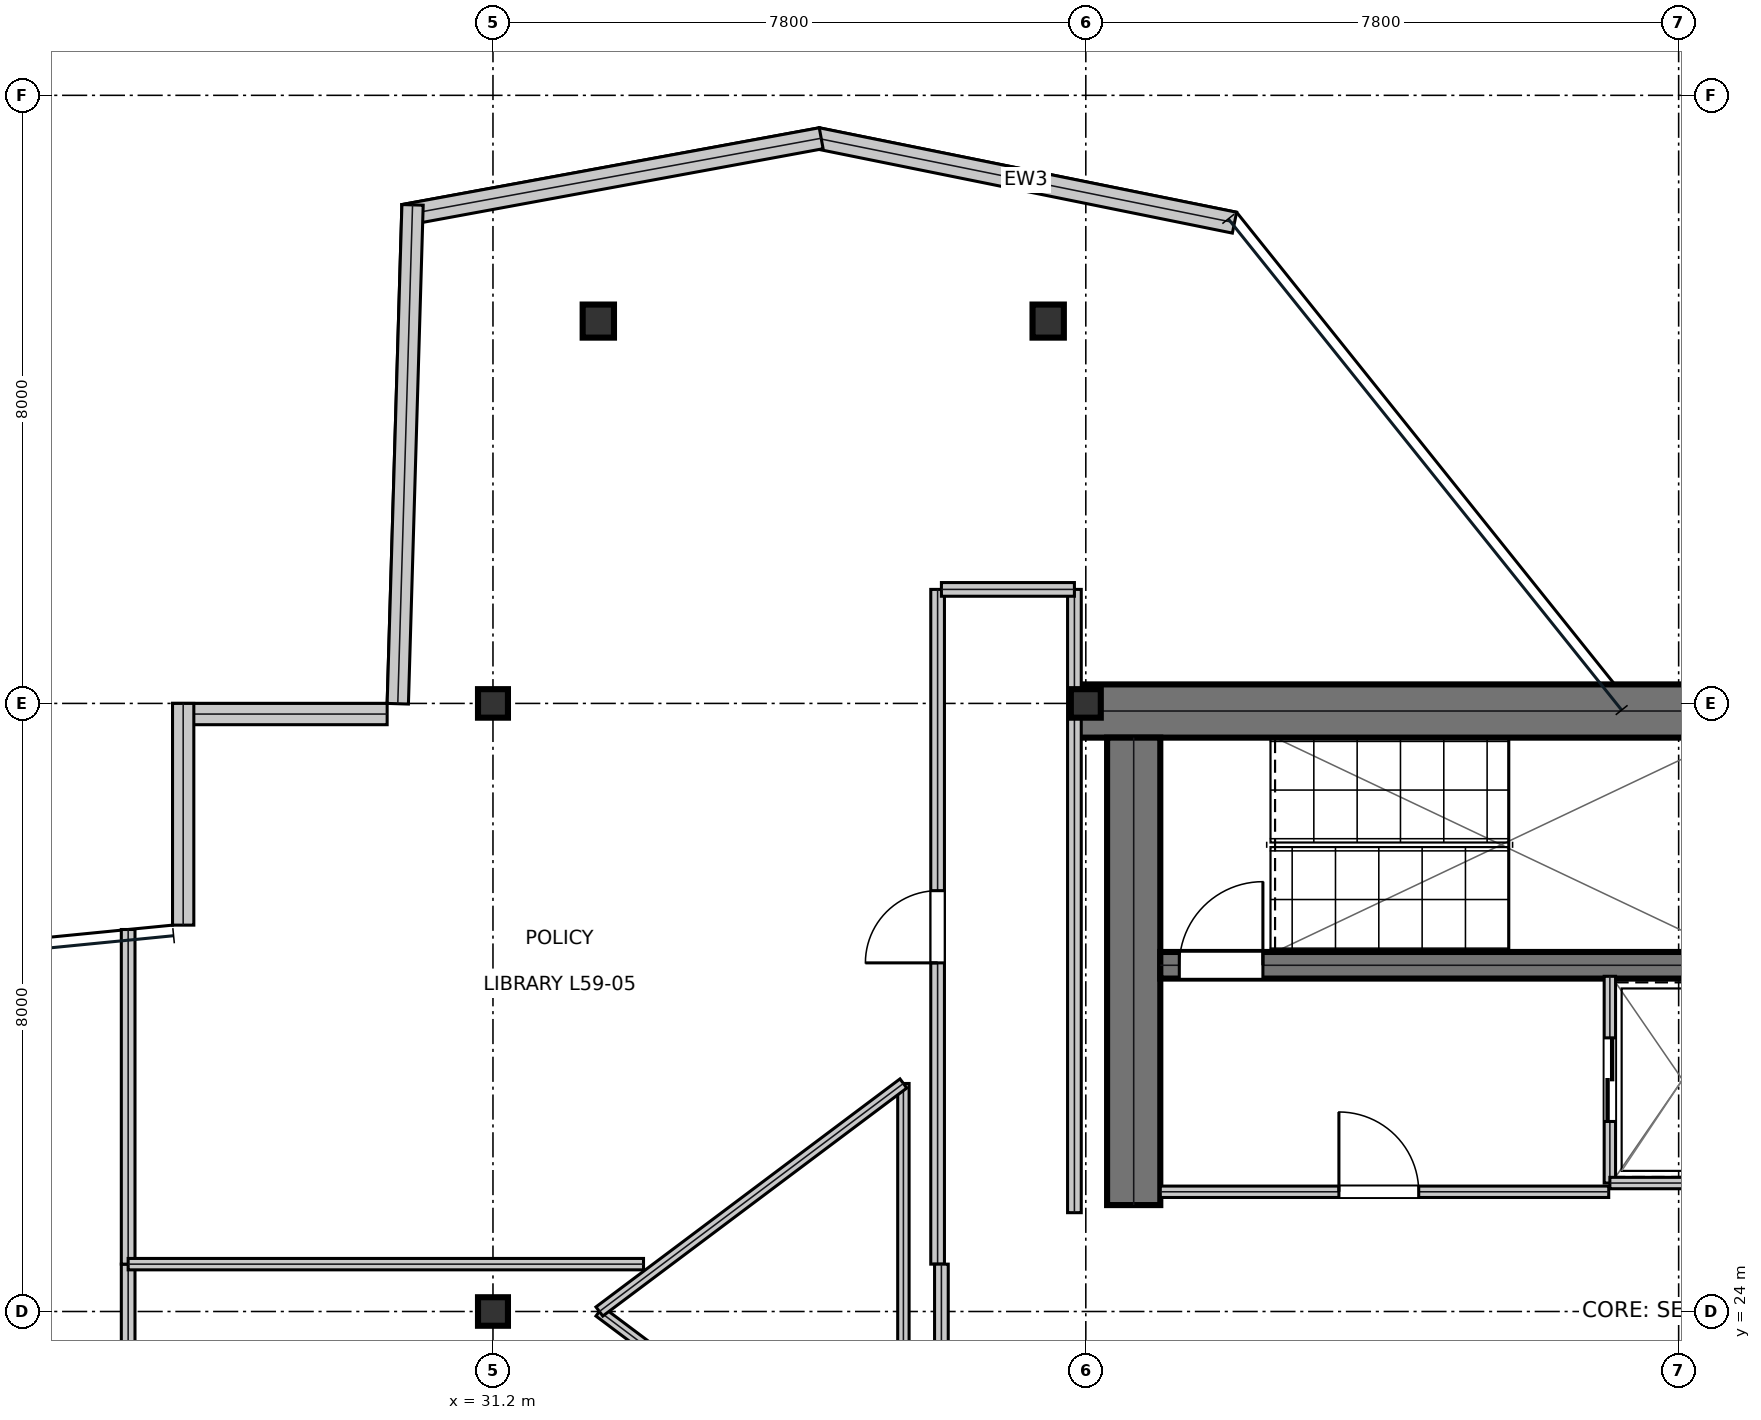
"""IFC4 building model, lengths in metres.
Left out: names, types, materials, properties, quantities, classifications, styles, units other than length and angle.
Written with IfcOpenShell. Run it as: python <this file> out.ifc"""

import sys

from ifc_helpers import new_model, si_unit, direction, frame, frame_2d, origin, origin_2d, place, context, subcontext, project, spatial, rectangle, i_section, extrude, element, fill, save


model = new_model("IFC4")
c1 = context("Model", 3, precision=1e-05, world=origin(), true_north=direction((0.0, 1.0)))
c2 = subcontext(c1, "Body", "Model", "MODEL_VIEW")
j1 = project(units=[si_unit("LENGTHUNIT", "METRE"), si_unit("PLANEANGLEUNIT", "RADIAN")], contexts=[c1])
p1 = place(None, origin())
s1 = spatial("IfcSite", under=j1, at=p1, CompositionType="ELEMENT")
p2 = place(p1, origin())
s2 = spatial("IfcBuilding", under=s1, at=p2, CompositionType="ELEMENT")
p3 = place(p2, frame((0.0, 0.0, 252.6)))
s3 = spatial("IfcBuildingStorey", under=s2, at=p3, CompositionType="ELEMENT", Elevation=252.6)
p4 = place(p3, frame((38.8, 31.9, 0.0), z_axis=(0.0, 0.0, 1.0), x_axis=(1.0, 0.0, 0.0)))
e1 = element("IfcWall", 1, at=p4, inside=s3, PredefinedType="SHEAR", context=c2, shape_type="SweptSolid", body=[
    extrude(rectangle(XDim=16.0, YDim=0.7, at=frame_2d((8.0, 0.0))), origin(), (0.0, 0.0, 1.0), 3.73),
])
p5 = place(p3, frame((39.63, 25.4, 0.0), z_axis=(0.0, 0.0, 1.0), x_axis=(0.0, 1.0, 0.0)))
e2 = element("IfcWall", 2, at=p5, inside=s3, PredefinedType="SHEAR", context=c2, shape_type="SweptSolid", body=[
    extrude(rectangle(XDim=6.15, YDim=0.7, at=frame_2d((3.075, 0.0))), origin(), (0.0, 0.0, 1.0), 3.73),
])
p6 = place(p3, frame((39.98, 28.555, 0.0), z_axis=(0.0, 0.0, 1.0), x_axis=(1.0, 0.0, 0.0)))
e3 = element("IfcWall", 3, at=p6, inside=s3, PredefinedType="SHEAR", context=c2, shape_type="SweptSolid", body=[
    extrude(rectangle(XDim=7.71, YDim=0.35, at=frame_2d((3.855, 0.0))), origin(), (0.0, 0.0, 1.0), 3.73),
])
p7 = place(p6, frame((0.25, 0.0, 0.0)))
e4 = element("IfcOpeningElement", 4, at=p7, cuts=e3, PredefinedType="OPENING", context=c2, shape_type="SweptSolid", body=[
    extrude(rectangle(XDim=1.1, YDim=2.15, at=frame_2d((0.55, 1.075))), frame((0.0, 0.185, 0.0), z_axis=(0.0, -1.0, 0.0), x_axis=(1.0, 0.0, 0.0)), (0.0, 0.0, 1.0), 0.37),
])
for number, where, z_axis, x_axis in (
    (5, (31.2, 24.0, 0.0), (0.0, 0.0, 1.0), (1.0, 0.0, 0.0)),
    (6, (31.2, 32.0, 0.0), (0.0, 0.0, 1.0), (1.0, 0.0, 0.0)),
    (7, (39.0, 32.0, 0.0), (0.0, 0.0, 1.0), (1.0, 0.0, 0.0)),
):
    element("IfcColumn", number, at=place(p3, frame(where, z_axis=z_axis, x_axis=x_axis)), inside=s3, PredefinedType="COLUMN", context=c2, shape_type="SweptSolid", body=[
        extrude(i_section(OverallWidth=0.394, OverallDepth=0.375, WebThickness=0.017, FlangeThickness=0.028, at=origin_2d()), origin(), (0.0, 0.0, 1.0), 4.044),
    ])
p8 = place(p3, frame((32.586, 37.03, 0.016), z_axis=(0.009051266318, -0.01943896122, 0.999770074249), x_axis=(0.90654468166, 0.422109867398, 0.0)))
e8 = element("IfcColumn", 8, at=p8, inside=s3, PredefinedType="COLUMN", context=c2, shape_type="SweptSolid", body=[
    extrude(i_section(OverallWidth=0.412, OverallDepth=0.435, WebThickness=0.036, FlangeThickness=0.058, at=origin_2d()), origin(), (0.0, 0.0, 1.0), 4.019),
])
p9 = place(p3, frame((38.505, 37.03, 0.016), z_axis=(-0.003219693154, -0.019439656781, 0.999805847813), x_axis=(0.986560065704, -0.163399010882, 0.0)))
e9 = element("IfcColumn", 9, at=p9, inside=s3, PredefinedType="COLUMN", context=c2, shape_type="SweptSolid", body=[
    extrude(i_section(OverallWidth=0.412, OverallDepth=0.435, WebThickness=0.036, FlangeThickness=0.058, at=origin_2d()), origin(), (0.0, 0.0, 1.0), 4.019),
])
p10 = place(p3, frame((40.956, 38.325, 0.0), z_axis=(0.0, 0.0, 1.0), x_axis=(-0.980137399087, 0.198319638238, 0.0)))
e10 = element("IfcWall", 10, at=p10, inside=s3, PredefinedType="STANDARD", context=c2, shape_type="SweptSolid", body=[
    extrude(rectangle(XDim=5.603, YDim=0.28, at=frame_2d((2.801, 0.0))), origin(), (0.0, 0.0, 1.0), 3.73),
])
p11 = place(p3, frame((35.518, 39.435, 0.0), z_axis=(0.0, 0.0, 1.0), x_axis=(-0.983500515457, -0.180905323571, 0.0)))
e11 = element("IfcWall", 11, at=p11, inside=s3, PredefinedType="STANDARD", context=c2, shape_type="SweptSolid", body=[
    extrude(rectangle(XDim=5.583, YDim=0.28, at=frame_2d((2.792, 0.0))), origin(), (0.0, 0.0, 1.0), 3.73),
])
p12 = place(p3, frame((30.142, 38.559, 0.0), z_axis=(0.0, 0.0, 1.0), x_axis=(-0.029597919089, -0.999561885621, 0.0)))
e12 = element("IfcWall", 12, at=p12, inside=s3, PredefinedType="STANDARD", context=c2, shape_type="SweptSolid", body=[
    extrude(rectangle(XDim=6.566, YDim=0.28, at=frame_2d((3.283, 0.0))), origin(), (0.0, 0.0, 1.0), 3.73),
])
p13 = place(p3, frame((29.808, 31.86, 0.0), z_axis=(0.0, 0.0, 1.0), x_axis=(-1.0, 0.0, 0.0)))
e13 = element("IfcWall", 13, at=p13, inside=s3, PredefinedType="STANDARD", context=c2, shape_type="SweptSolid", body=[
    extrude(rectangle(XDim=2.824, YDim=0.28, at=frame_2d((1.412, 0.0))), origin(), (0.0, 0.0, 1.0), 3.73),
])
p14 = place(p3, frame((27.124, 32.0, 0.0), z_axis=(0.0, 0.0, 1.0), x_axis=(0.0, -1.0, 0.0)))
e14 = element("IfcWall", 14, at=p14, inside=s3, PredefinedType="STANDARD", context=c2, shape_type="SweptSolid", body=[
    extrude(rectangle(XDim=2.917, YDim=0.28, at=frame_2d((1.458, 0.0))), origin(), (0.0, 0.0, 1.0), 3.259),
])
p15 = place(p3, frame((39.98, 25.575, 0.0), z_axis=(0.0, 0.0, 1.0), x_axis=(1.0, 0.0, 0.0)))
e15 = element("IfcWall", 15, at=p15, inside=s3, PredefinedType="PARTITIONING", context=c2, shape_type="SweptSolid", body=[
    extrude(rectangle(XDim=5.9, YDim=0.15, at=frame_2d((2.95, 0.0))), origin(), (0.0, 0.0, 1.0), 3.73),
])
p16 = place(p15, frame((2.35, 0.0, 0.0)))
e16 = element("IfcOpeningElement", 16, at=p16, cuts=e15, PredefinedType="OPENING", context=c2, shape_type="SweptSolid", body=[
    extrude(rectangle(XDim=1.05, YDim=2.15, at=frame_2d((0.525, 1.075))), frame((0.0, 0.085, 0.0), z_axis=(0.0, -1.0, 0.0), x_axis=(1.0, 0.0, 0.0)), (0.0, 0.0, 1.0), 0.17),
])
p17 = place(p3, frame((45.895, 25.69, 0.0), z_axis=(0.0, 0.0, 1.0), x_axis=(0.0, 1.0, 0.0)))
e17 = element("IfcWall", 17, at=p17, inside=s3, PredefinedType="PARTITIONING", context=c2, shape_type="SweptSolid", body=[
    extrude(rectangle(XDim=2.72, YDim=0.15, at=frame_2d((1.36, 0.0))), origin(), (0.0, 0.0, 1.0), 3.73),
])
p18 = place(p17, frame((0.81, 0.0, 0.0)))
e18 = element("IfcOpeningElement", 18, at=p18, cuts=e17, PredefinedType="OPENING", context=c2, shape_type="SweptSolid", body=[
    extrude(rectangle(XDim=1.1, YDim=2.15, at=frame_2d((0.55, 1.075))), frame((0.0, 0.085, 0.0), z_axis=(0.0, -1.0, 0.0), x_axis=(1.0, 0.0, 0.0)), (0.0, 0.0, 1.0), 0.17),
])
p19 = place(p3, frame((45.895, 25.69, 0.0), z_axis=(0.0, 0.0, 1.0), x_axis=(1.0, 0.0, 0.0)))
e19 = element("IfcWall", 19, at=p19, inside=s3, PredefinedType="PARTITIONING", context=c2, shape_type="SweptSolid", body=[
    extrude(rectangle(XDim=1.915, YDim=0.15, at=frame_2d((0.958, 0.0))), origin(), (0.0, 0.0, 1.0), 3.73),
])
p20 = place(p3, frame((37.05, 24.623, 0.0), z_axis=(0.0, 0.0, 1.0), x_axis=(0.0, 1.0, 0.0)))
e20 = element("IfcWall", 20, at=p20, inside=s3, PredefinedType="SOLIDWALL", context=c2, shape_type="SweptSolid", body=[
    extrude(rectangle(XDim=8.877, YDim=0.18, at=frame_2d((4.438, 0.0))), origin(), (0.0, 0.0, 1.0), 3.181),
])
p21 = place(p20, frame((3.963, 0.0, 0.0)))
e21 = element("IfcOpeningElement", 21, at=p21, cuts=e20, PredefinedType="OPENING", context=c2, shape_type="SweptSolid", body=[
    extrude(rectangle(XDim=0.95, YDim=2.15, at=frame_2d((0.475, 1.075))), frame((0.0, 0.1, 0.0), z_axis=(0.0, -1.0, 0.0), x_axis=(1.0, 0.0, 0.0)), (0.0, 0.0, 1.0), 0.2),
])
p22 = place(p3, frame((26.4, 20.6, 0.0), z_axis=(0.0, 0.0, 1.0), x_axis=(0.0, 1.0, 0.0)))
e22 = element("IfcWall", 22, at=p22, inside=s3, PredefinedType="SOLIDWALL", context=c2, shape_type="SweptSolid", body=[
    extrude(rectangle(XDim=4.023, YDim=0.18, at=frame_2d((2.011, 0.0))), origin(), (0.0, 0.0, 1.0), 3.181),
])
p23 = place(p3, frame((37.1, 20.6, 0.0), z_axis=(0.0, 0.0, 1.0), x_axis=(0.0, 1.0, 0.0)))
e23 = element("IfcWall", 23, at=p23, inside=s3, PredefinedType="SOLIDWALL", context=c2, shape_type="SweptSolid", body=[
    extrude(rectangle(XDim=4.023, YDim=0.18, at=frame_2d((2.011, 0.0))), origin(), (0.0, 0.0, 1.0), 3.73),
])
p24 = place(p3, frame((38.85, 25.3, 0.0), z_axis=(0.0, 0.0, 1.0), x_axis=(0.0, 1.0, 0.0)))
e24 = element("IfcWall", 24, at=p24, inside=s3, PredefinedType="SOLIDWALL", context=c2, shape_type="SweptSolid", body=[
    extrude(rectangle(XDim=8.2, YDim=0.18, at=frame_2d((4.1, 0.0))), origin(), (0.0, 0.0, 1.0), 3.181),
])
p25 = place(p3, frame((26.4, 24.623, 0.0), z_axis=(0.0, 0.0, 1.0), x_axis=(0.0, 1.0, 0.0)))
e25 = element("IfcWall", 25, at=p25, inside=s3, PredefinedType="SOLIDWALL", context=c2, shape_type="SweptSolid", body=[
    extrude(rectangle(XDim=4.403, YDim=0.18, at=frame_2d((2.201, 0.0))), origin(), (0.0, 0.0, 1.0), 3.181),
])
p26 = place(p3, frame((37.1, 33.5, 0.0), z_axis=(0.0, 0.0, 1.0), x_axis=(1.0, 0.0, 0.0)))
e26 = element("IfcWall", 26, at=p26, inside=s3, PredefinedType="SOLIDWALL", context=c2, shape_type="SweptSolid", body=[
    extrude(rectangle(XDim=1.75, YDim=0.18, at=frame_2d((0.875, 0.0))), origin(), (0.0, 0.0, 1.0), 3.181),
])
p27 = place(p3, frame((26.4, 24.623, 0.0), z_axis=(0.0, 0.0, 1.0), x_axis=(1.0, 0.0, 0.0)))
e27 = element("IfcWall", 27, at=p27, inside=s3, PredefinedType="MOVABLE", context=c2, shape_type="SweptSolid", body=[
    extrude(rectangle(XDim=6.781, YDim=0.15, at=frame_2d((3.39, 0.0))), origin(), (0.0, 0.0, 1.0), 3.181),
])
p28 = place(p3, frame((32.6, 24.0, 0.0), z_axis=(0.0, 0.0, 1.0), x_axis=(0.8, -0.6, 0.0)))
e28 = element("IfcWall", 28, at=p28, inside=s3, PredefinedType="MOVABLE", context=c2, shape_type="SweptSolid", body=[
    extrude(rectangle(XDim=5.0, YDim=0.15, at=frame_2d((2.5, 0.0))), origin(), (0.0, 0.0, 1.0), 3.73),
])
p29 = place(p3, frame((36.6, 21.0, 0.0), z_axis=(0.0, 0.0, 1.0), x_axis=(0.0, 1.0, 0.0)))
e29 = element("IfcWall", 29, at=p29, inside=s3, PredefinedType="MOVABLE", context=c2, shape_type="SweptSolid", body=[
    extrude(rectangle(XDim=6.0, YDim=0.15, at=frame_2d((3.0, 0.0))), origin(), (0.0, 0.0, 1.0), 3.73),
])
p30 = place(p3, frame((36.6, 27.0, 0.0), z_axis=(0.0, 0.0, 1.0), x_axis=(-0.8, -0.6, 0.0)))
e30 = element("IfcWall", 30, at=p30, inside=s3, PredefinedType="MOVABLE", context=c2, shape_type="SweptSolid", body=[
    extrude(rectangle(XDim=5.0, YDim=0.15, at=frame_2d((2.5, 0.0))), origin(), (0.0, 0.0, 1.0), 3.73),
])
p31 = place(p16, origin())
e31 = element("IfcDoor", 31, at=p31, inside=s3, OperationType="SINGLE_SWING_LEFT", PredefinedType="DOOR", context=c2, shape_type="SweptSolid", body=[
    extrude(rectangle(XDim=1.05, YDim=2.15, at=frame_2d((0.525, 1.075))), frame((0.0, 0.025, 0.0), z_axis=(0.0, -1.0, 0.0), x_axis=(1.0, 0.0, 0.0)), (0.0, 0.0, 1.0), 0.05),
])
fill(e16, e31)
p32 = place(p18, frame((1.1, 0.0, 0.0), z_axis=(0.0, 0.0, 1.0), x_axis=(-1.0, 0.0, 0.0)))
e32 = element("IfcDoor", 32, at=p32, inside=s3, OperationType="DOUBLE_DOOR_SLIDING", PredefinedType="DOOR", context=c2, shape_type="SweptSolid", body=[
    extrude(rectangle(XDim=1.1, YDim=2.15, at=frame_2d((0.55, 1.075))), frame((0.0, 0.025, 0.0), z_axis=(0.0, -1.0, 0.0), x_axis=(1.0, 0.0, 0.0)), (0.0, 0.0, 1.0), 0.05),
])
fill(e18, e32)
p33 = place(p21, origin())
e33 = element("IfcDoor", 33, at=p33, inside=s3, OperationType="SINGLE_SWING_LEFT", PredefinedType="DOOR", context=c2, shape_type="SweptSolid", body=[
    extrude(rectangle(XDim=0.95, YDim=2.15, at=frame_2d((0.475, 1.075))), frame((0.0, 0.025, 0.0), z_axis=(0.0, -1.0, 0.0), x_axis=(1.0, 0.0, 0.0)), (0.0, 0.0, 1.0), 0.05),
])
fill(e21, e33)
p34 = place(p7, origin())
e34 = element("IfcDoor", 34, at=p34, inside=s3, OperationType="SINGLE_SWING_RIGHT", PredefinedType="DOOR", context=c2, shape_type="SweptSolid", body=[
    extrude(rectangle(XDim=1.1, YDim=2.15, at=frame_2d((0.55, 1.075))), frame((0.0, 0.025, 0.0), z_axis=(0.0, -1.0, 0.0), x_axis=(1.0, 0.0, 0.0)), (0.0, 0.0, 1.0), 0.05),
])
fill(e4, e34)
save(model, sys.argv[1])
